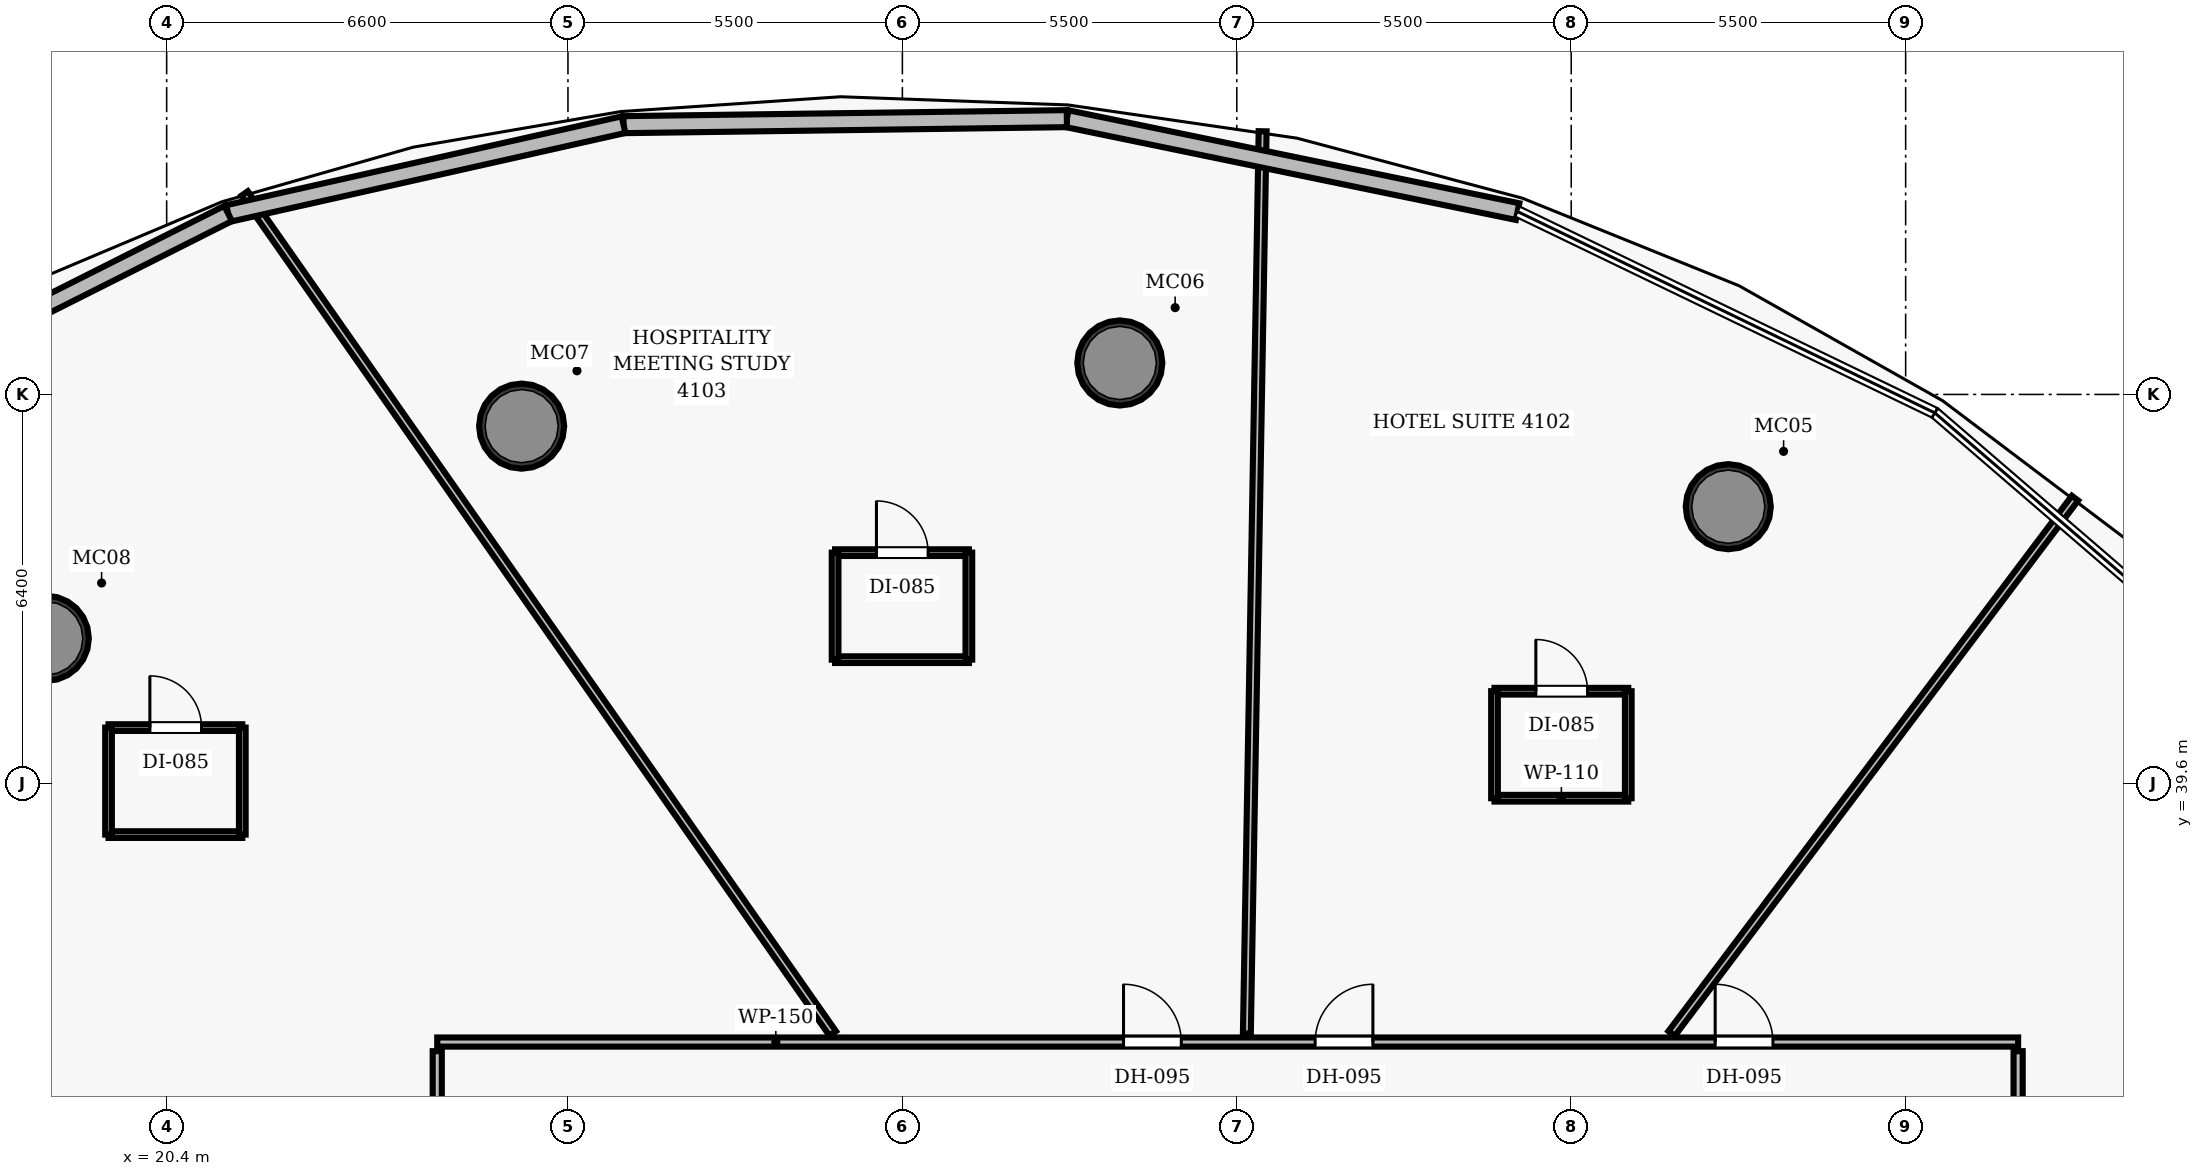
"""IFC4 building model, lengths in metres.
Left out: names, types, materials, properties, quantities, classifications, styles, units other than length and angle.
Written with IfcOpenShell. Run it as: python <this file> out.ifc"""

import sys

from ifc_helpers import new_model, si_unit, direction, frame, frame_2d, origin, origin_2d, place, context, subcontext, project, spatial, rectangle, hollow_circle, extrude, element, fill, save


model = new_model("IFC4")
c1 = context("Model", 3, precision=1e-05, world=origin(), true_north=direction((0.0, 1.0)))
c2 = subcontext(c1, "Body", "Model", "MODEL_VIEW")
j1 = project(units=[si_unit("LENGTHUNIT", "METRE"), si_unit("PLANEANGLEUNIT", "RADIAN")], contexts=[c1])
p1 = place(None, origin())
s1 = spatial("IfcSite", under=j1, at=p1, CompositionType="ELEMENT")
p2 = place(p1, origin())
s2 = spatial("IfcBuilding", under=s1, at=p2, CompositionType="ELEMENT")
p3 = place(p2, frame((0.0, 0.0, 162.3)))
s3 = spatial("IfcBuildingStorey", under=s2, at=p3, CompositionType="ELEMENT", Elevation=162.3)
for number, where, z_axis, x_axis in (
    (1, (46.083, 44.154, 0.0), (0.0, 0.0, 1.0), (1.0, 0.0, 0.0)),
    (2, (36.076, 46.517, 0.0), (0.0, 0.0, 1.0), (1.0, 0.0, 0.0)),
    (3, (26.238, 45.479, 0.0), (0.0, 0.0, 1.0), (1.0, 0.0, 0.0)),
    (4, (18.42, 41.989, 0.0), (0.0, 0.0, 1.0), (1.0, 0.0, 0.0)),
):
    element("IfcColumn", number, at=place(p3, frame(where, z_axis=z_axis, x_axis=x_axis)), inside=s3, PredefinedType="COLUMN", context=c2, shape_type="SweptSolid", body=[
        extrude(hollow_circle(Radius=0.7, WallThickness=0.055, at=origin_2d()), origin(), (0.0, 0.0, 1.0), 3.5),
    ])
p4 = place(p3, frame((24.85, 35.35, 0.0), z_axis=(0.0, 0.0, 1.0), x_axis=(1.0, 0.0, 0.0)))
e5 = element("IfcWall", 5, at=p4, inside=s3, PredefinedType="PARTITIONING", context=c2, shape_type="SweptSolid", body=[
    extrude(rectangle(XDim=26.0, YDim=0.15, at=frame_2d((13.0, 0.0))), origin(), (0.0, 0.0, 1.0), 2.565),
])
p5 = place(p4, frame((21.017, 0.0, 0.0)))
e6 = element("IfcOpeningElement", 6, at=p5, cuts=e5, PredefinedType="OPENING", context=c2, shape_type="SweptSolid", body=[
    extrude(rectangle(XDim=0.95, YDim=2.15, at=frame_2d((0.475, 1.075))), frame((0.0, 0.085, 0.0), z_axis=(0.0, -1.0, 0.0), x_axis=(1.0, 0.0, 0.0)), (0.0, 0.0, 1.0), 0.17),
])
p6 = place(p4, frame((14.438, 0.0, 0.0)))
e7 = element("IfcOpeningElement", 7, at=p6, cuts=e5, PredefinedType="OPENING", context=c2, shape_type="SweptSolid", body=[
    extrude(rectangle(XDim=0.95, YDim=2.15, at=frame_2d((0.475, 1.075))), frame((0.0, 0.085, 0.0), z_axis=(0.0, -1.0, 0.0), x_axis=(1.0, 0.0, 0.0)), (0.0, 0.0, 1.0), 0.17),
])
p7 = place(p4, frame((11.287, 0.0, 0.0)))
e8 = element("IfcOpeningElement", 8, at=p7, cuts=e5, PredefinedType="OPENING", context=c2, shape_type="SweptSolid", body=[
    extrude(rectangle(XDim=0.95, YDim=2.15, at=frame_2d((0.475, 1.075))), frame((0.0, 0.085, 0.0), z_axis=(0.0, -1.0, 0.0), x_axis=(1.0, 0.0, 0.0)), (0.0, 0.0, 1.0), 0.17),
])
p8 = place(p3, frame((24.85, 27.08, 0.0), z_axis=(0.0, 0.0, 1.0), x_axis=(0.0, 1.0, 0.0)))
e9 = element("IfcWall", 9, at=p8, inside=s3, PredefinedType="PARTITIONING", context=c2, shape_type="SweptSolid", body=[
    extrude(rectangle(XDim=8.12, YDim=0.15, at=frame_2d((4.06, 0.0))), origin(), (0.0, 0.0, 1.0), 2.565),
])
p9 = place(p8, frame((4.442, 0.0, 0.0)))
e10 = element("IfcOpeningElement", 10, at=p9, cuts=e9, PredefinedType="OPENING", context=c2, shape_type="SweptSolid", body=[
    extrude(rectangle(XDim=0.95, YDim=2.15, at=frame_2d((0.475, 1.075))), frame((0.0, 0.085, 0.0), z_axis=(0.0, -1.0, 0.0), x_axis=(1.0, 0.0, 0.0)), (0.0, 0.0, 1.0), 0.17),
])
p10 = place(p3, frame((50.85, 27.08, 0.0), z_axis=(0.0, 0.0, 1.0), x_axis=(0.0, 1.0, 0.0)))
e11 = element("IfcWall", 11, at=p10, inside=s3, PredefinedType="PARTITIONING", context=c2, shape_type="SweptSolid", body=[
    extrude(rectangle(XDim=8.12, YDim=0.15, at=frame_2d((4.06, 0.0))), origin(), (0.0, 0.0, 1.0), 2.565),
])
p11 = place(p3, frame((45.151, 35.49, 0.0), z_axis=(0.0, 0.0, 1.0), x_axis=(0.60181625772, 0.798634579732, 0.0)))
e12 = element("IfcWall", 12, at=p11, inside=s3, PredefinedType="PARTITIONING", context=c2, shape_type="SweptSolid", body=[
    extrude(rectangle(XDim=11.024, YDim=0.13, at=frame_2d((5.512, 0.0))), origin(), (0.0, 0.0, 1.0), 2.565),
])
p12 = place(p3, frame((38.166, 35.49, 0.0), z_axis=(0.0, 0.0, 1.0), x_axis=(0.017454889407, 0.999847651813, 0.0)))
e13 = element("IfcWall", 13, at=p12, inside=s3, PredefinedType="PARTITIONING", context=c2, shape_type="SweptSolid", body=[
    extrude(rectangle(XDim=14.84, YDim=0.13, at=frame_2d((7.42, 0.0))), origin(), (0.0, 0.0, 1.0), 2.565),
])
p13 = place(p3, frame((31.355, 35.49, 0.0), z_axis=(0.0, 0.0, 1.0), x_axis=(-0.573576982677, 0.819151661747, 0.0)))
e14 = element("IfcWall", 14, at=p13, inside=s3, PredefinedType="PARTITIONING", context=c2, shape_type="SweptSolid", body=[
    extrude(rectangle(XDim=16.865, YDim=0.13, at=frame_2d((8.433, 0.0))), origin(), (0.0, 0.0, 1.0), 2.565),
])
p14 = place(p3, frame((24.71, 30.576, 0.0), z_axis=(0.0, 0.0, 1.0), x_axis=(-0.945518452422, 0.32556851219, 0.0)))
e15 = element("IfcWall", 15, at=p14, inside=s3, PredefinedType="PARTITIONING", context=c2, shape_type="SweptSolid", body=[
    extrude(rectangle(XDim=15.453, YDim=0.13, at=frame_2d((7.727, 0.0))), origin(), (0.0, 0.0, 1.0), 2.565),
])
p15 = place(p3, frame((42.238, 39.36, 0.0), z_axis=(0.0, 0.0, 1.0), x_axis=(1.0, 0.0, 0.0)))
e16 = element("IfcWall", 16, at=p15, inside=s3, PredefinedType="PARTITIONING", context=c2, shape_type="SweptSolid", body=[
    extrude(rectangle(XDim=2.2, YDim=0.11, at=frame_2d((1.1, 0.0))), origin(), (0.0, 0.0, 1.0), 2.565),
])
p16 = place(p3, frame((42.238, 41.12, 0.0), z_axis=(0.0, 0.0, 1.0), x_axis=(1.0, 0.0, 0.0)))
e17 = element("IfcWall", 17, at=p16, inside=s3, PredefinedType="PARTITIONING", context=c2, shape_type="SweptSolid", body=[
    extrude(rectangle(XDim=2.2, YDim=0.11, at=frame_2d((1.1, 0.0))), origin(), (0.0, 0.0, 1.0), 2.565),
])
p17 = place(p16, frame((0.68, 0.0, 0.0)))
e18 = element("IfcOpeningElement", 18, at=p17, cuts=e17, PredefinedType="OPENING", context=c2, shape_type="SweptSolid", body=[
    extrude(rectangle(XDim=0.85, YDim=2.1, at=frame_2d((0.425, 1.05))), frame((0.0, 0.065, 0.0), z_axis=(0.0, -1.0, 0.0), x_axis=(1.0, 0.0, 0.0)), (0.0, 0.0, 1.0), 0.13),
])
for number, where, z_axis, x_axis in (
    (19, (42.238, 39.36, 0.0), (0.0, 0.0, 1.0), (0.0, 1.0, 0.0)),
    (20, (44.438, 39.36, 0.0), (0.0, 0.0, 1.0), (0.0, 1.0, 0.0)),
):
    element("IfcWall", number, at=place(p3, frame(where, z_axis=z_axis, x_axis=x_axis)), inside=s3, PredefinedType="PARTITIONING", context=c2, shape_type="SweptSolid", body=[
        extrude(rectangle(XDim=1.76, YDim=0.11, at=frame_2d((0.88, 0.0))), origin(), (0.0, 0.0, 1.0), 2.565),
    ])
p18 = place(p3, frame((31.393, 41.638, 0.0), z_axis=(0.0, 0.0, 1.0), x_axis=(1.0, 0.0, 0.0)))
e21 = element("IfcWall", 21, at=p18, inside=s3, PredefinedType="PARTITIONING", context=c2, shape_type="SweptSolid", body=[
    extrude(rectangle(XDim=2.2, YDim=0.11, at=frame_2d((1.1, 0.0))), origin(), (0.0, 0.0, 1.0), 2.565),
])
p19 = place(p3, frame((31.393, 43.398, 0.0), z_axis=(0.0, 0.0, 1.0), x_axis=(1.0, 0.0, 0.0)))
e22 = element("IfcWall", 22, at=p19, inside=s3, PredefinedType="PARTITIONING", context=c2, shape_type="SweptSolid", body=[
    extrude(rectangle(XDim=2.2, YDim=0.11, at=frame_2d((1.1, 0.0))), origin(), (0.0, 0.0, 1.0), 2.565),
])
p20 = place(p19, frame((0.68, 0.0, 0.0)))
e23 = element("IfcOpeningElement", 23, at=p20, cuts=e22, PredefinedType="OPENING", context=c2, shape_type="SweptSolid", body=[
    extrude(rectangle(XDim=0.85, YDim=2.1, at=frame_2d((0.425, 1.05))), frame((0.0, 0.065, 0.0), z_axis=(0.0, -1.0, 0.0), x_axis=(1.0, 0.0, 0.0)), (0.0, 0.0, 1.0), 0.13),
])
for number, where, z_axis, x_axis in (
    (24, (31.393, 41.638, 0.0), (0.0, 0.0, 1.0), (0.0, 1.0, 0.0)),
    (25, (33.594, 41.638, 0.0), (0.0, 0.0, 1.0), (0.0, 1.0, 0.0)),
):
    element("IfcWall", number, at=place(p3, frame(where, z_axis=z_axis, x_axis=x_axis)), inside=s3, PredefinedType="PARTITIONING", context=c2, shape_type="SweptSolid", body=[
        extrude(rectangle(XDim=1.76, YDim=0.11, at=frame_2d((0.88, 0.0))), origin(), (0.0, 0.0, 1.0), 2.565),
    ])
p21 = place(p3, frame((19.444, 38.761, 0.0), z_axis=(0.0, 0.0, 1.0), x_axis=(1.0, 0.0, 0.0)))
e26 = element("IfcWall", 26, at=p21, inside=s3, PredefinedType="PARTITIONING", context=c2, shape_type="SweptSolid", body=[
    extrude(rectangle(XDim=2.2, YDim=0.11, at=frame_2d((1.1, 0.0))), origin(), (0.0, 0.0, 1.0), 2.565),
])
p22 = place(p3, frame((19.444, 40.521, 0.0), z_axis=(0.0, 0.0, 1.0), x_axis=(1.0, 0.0, 0.0)))
e27 = element("IfcWall", 27, at=p22, inside=s3, PredefinedType="PARTITIONING", context=c2, shape_type="SweptSolid", body=[
    extrude(rectangle(XDim=2.2, YDim=0.11, at=frame_2d((1.1, 0.0))), origin(), (0.0, 0.0, 1.0), 2.565),
])
p23 = place(p22, frame((0.68, 0.0, 0.0)))
e28 = element("IfcOpeningElement", 28, at=p23, cuts=e27, PredefinedType="OPENING", context=c2, shape_type="SweptSolid", body=[
    extrude(rectangle(XDim=0.85, YDim=2.1, at=frame_2d((0.425, 1.05))), frame((0.0, 0.065, 0.0), z_axis=(0.0, -1.0, 0.0), x_axis=(1.0, 0.0, 0.0)), (0.0, 0.0, 1.0), 0.13),
])
for number, where, z_axis, x_axis in (
    (29, (19.444, 38.761, 0.0), (0.0, 0.0, 1.0), (0.0, 1.0, 0.0)),
    (30, (21.644, 38.761, 0.0), (0.0, 0.0, 1.0), (0.0, 1.0, 0.0)),
):
    element("IfcWall", number, at=place(p3, frame(where, z_axis=z_axis, x_axis=x_axis)), inside=s3, PredefinedType="PARTITIONING", context=c2, shape_type="SweptSolid", body=[
        extrude(rectangle(XDim=1.76, YDim=0.11, at=frame_2d((0.88, 0.0))), origin(), (0.0, 0.0, 1.0), 2.565),
    ])
p24 = place(p3, frame((35.205, 50.535, 0.0), z_axis=(0.0, 0.0, 1.0), x_axis=(0.979395914259, -0.201949605427, 0.0)))
e31 = element("IfcWall", 31, at=p24, inside=s3, PredefinedType="SOLIDWALL", context=c2, shape_type="SweptSolid", body=[
    extrude(rectangle(XDim=7.569, YDim=0.28, at=frame_2d((3.785, 0.0))), origin(), (0.0, 0.0, 1.0), 3.15),
])
p25 = place(p3, frame((27.914, 50.437, 0.0), z_axis=(0.0, 0.0, 1.0), x_axis=(0.999908061986, 0.013559777837, 0.0)))
e32 = element("IfcWall", 32, at=p25, inside=s3, PredefinedType="SOLIDWALL", context=c2, shape_type="SweptSolid", body=[
    extrude(rectangle(XDim=7.292, YDim=0.28, at=frame_2d((3.646, 0.0))), origin(), (0.0, 0.0, 1.0), 3.15),
])
p26 = place(p3, frame((21.411, 48.976, 0.0), z_axis=(0.0, 0.0, 1.0), x_axis=(0.975681090839, 0.219194910932, 0.0)))
e33 = element("IfcWall", 33, at=p26, inside=s3, PredefinedType="SOLIDWALL", context=c2, shape_type="SweptSolid", body=[
    extrude(rectangle(XDim=6.665, YDim=0.28, at=frame_2d((3.333, 0.0))), origin(), (0.0, 0.0, 1.0), 3.15),
])
p27 = place(p3, frame((16.209, 46.359, 0.0), z_axis=(0.0, 0.0, 1.0), x_axis=(0.893317552625, 0.449426023026, 0.0)))
e34 = element("IfcWall", 34, at=p27, inside=s3, PredefinedType="SOLIDWALL", context=c2, shape_type="SweptSolid", body=[
    extrude(rectangle(XDim=5.823, YDim=0.28, at=frame_2d((2.911, 0.0))), origin(), (0.0, 0.0, 1.0), 3.15),
])
p28 = place(p5, origin())
e35 = element("IfcDoor", 35, at=p28, inside=s3, OperationType="SINGLE_SWING_LEFT", PredefinedType="DOOR", context=c2, shape_type="SweptSolid", body=[
    extrude(rectangle(XDim=0.95, YDim=2.15, at=frame_2d((0.475, 1.075))), frame((0.0, 0.025, 0.0), z_axis=(0.0, -1.0, 0.0), x_axis=(1.0, 0.0, 0.0)), (0.0, 0.0, 1.0), 0.05),
])
fill(e6, e35)
p29 = place(p6, origin())
e36 = element("IfcDoor", 36, at=p29, inside=s3, OperationType="SINGLE_SWING_RIGHT", PredefinedType="DOOR", context=c2, shape_type="SweptSolid", body=[
    extrude(rectangle(XDim=0.95, YDim=2.15, at=frame_2d((0.475, 1.075))), frame((0.0, 0.025, 0.0), z_axis=(0.0, -1.0, 0.0), x_axis=(1.0, 0.0, 0.0)), (0.0, 0.0, 1.0), 0.05),
])
fill(e7, e36)
p30 = place(p17, origin())
e37 = element("IfcDoor", 37, at=p30, inside=s3, OperationType="SINGLE_SWING_LEFT", PredefinedType="DOOR", context=c2, shape_type="SweptSolid", body=[
    extrude(rectangle(XDim=0.85, YDim=2.1, at=frame_2d((0.425, 1.05))), frame((0.0, 0.025, 0.0), z_axis=(0.0, -1.0, 0.0), x_axis=(1.0, 0.0, 0.0)), (0.0, 0.0, 1.0), 0.05),
])
fill(e18, e37)
p31 = place(p7, origin())
e38 = element("IfcDoor", 38, at=p31, inside=s3, OperationType="SINGLE_SWING_LEFT", PredefinedType="DOOR", context=c2, shape_type="SweptSolid", body=[
    extrude(rectangle(XDim=0.95, YDim=2.15, at=frame_2d((0.475, 1.075))), frame((0.0, 0.025, 0.0), z_axis=(0.0, -1.0, 0.0), x_axis=(1.0, 0.0, 0.0)), (0.0, 0.0, 1.0), 0.05),
])
fill(e8, e38)
p32 = place(p20, origin())
e39 = element("IfcDoor", 39, at=p32, inside=s3, OperationType="SINGLE_SWING_LEFT", PredefinedType="DOOR", context=c2, shape_type="SweptSolid", body=[
    extrude(rectangle(XDim=0.85, YDim=2.1, at=frame_2d((0.425, 1.05))), frame((0.0, 0.025, 0.0), z_axis=(0.0, -1.0, 0.0), x_axis=(1.0, 0.0, 0.0)), (0.0, 0.0, 1.0), 0.05),
])
fill(e23, e39)
p33 = place(p23, origin())
e40 = element("IfcDoor", 40, at=p33, inside=s3, OperationType="SINGLE_SWING_LEFT", PredefinedType="DOOR", context=c2, shape_type="SweptSolid", body=[
    extrude(rectangle(XDim=0.85, YDim=2.1, at=frame_2d((0.425, 1.05))), frame((0.0, 0.025, 0.0), z_axis=(0.0, -1.0, 0.0), x_axis=(1.0, 0.0, 0.0)), (0.0, 0.0, 1.0), 0.05),
])
fill(e28, e40)
save(model, sys.argv[1])
